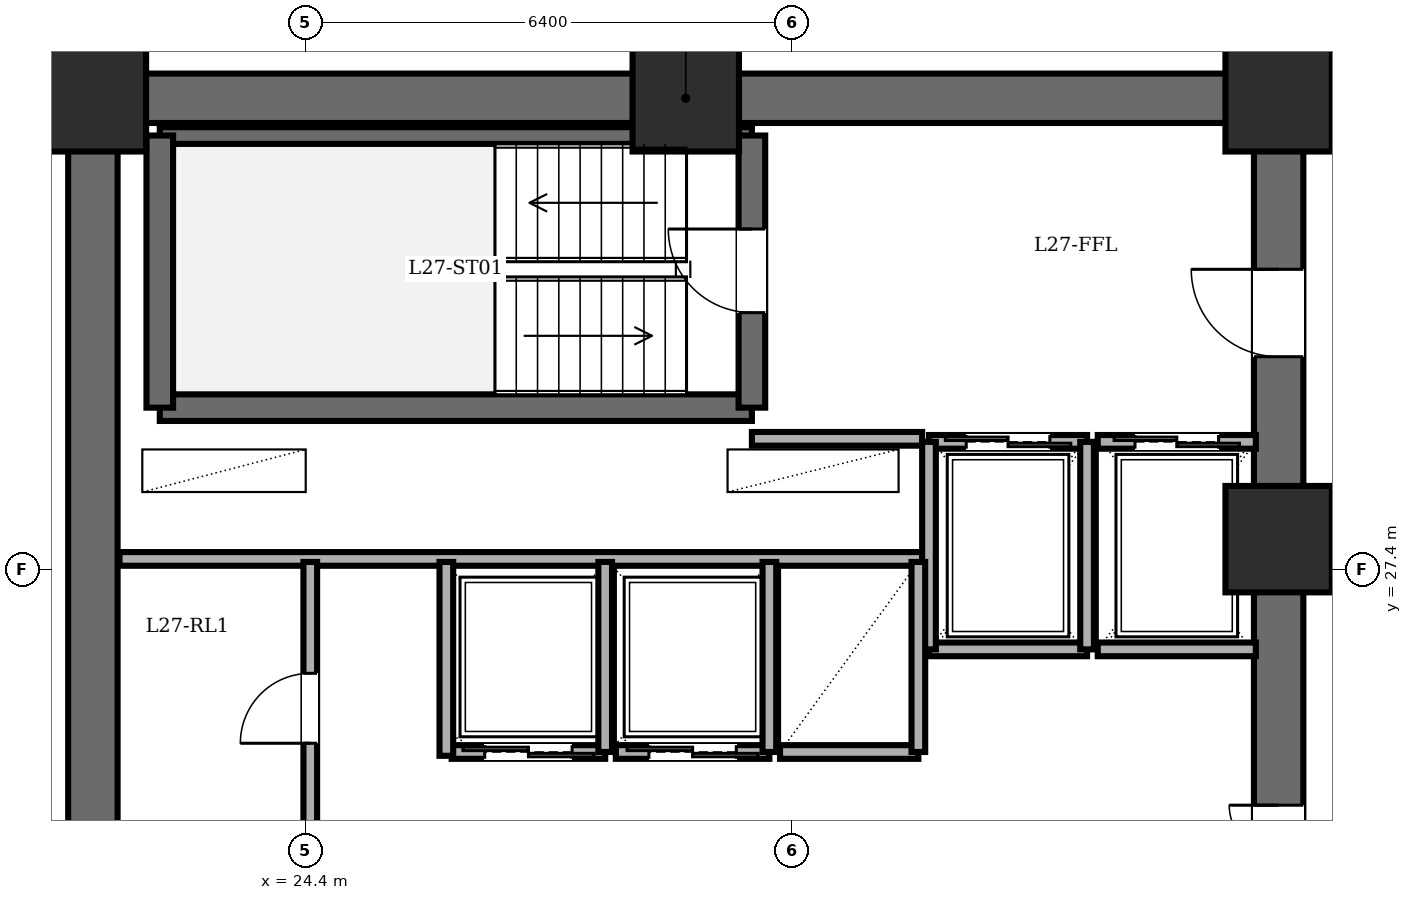
"""IFC4 building model, lengths in metres.
Left out: names, types, materials, properties, quantities, classifications, styles, units other than length and angle.
Written with IfcOpenShell. Run it as: python <this file> out.ifc"""

import sys

from ifc_helpers import new_model, si_unit, direction, frame, frame_2d, origin, origin_2d, place, context, subcontext, project, spatial, rectangle, extrude, element, fill, save


model = new_model("IFC4")
c1 = context("Model", 3, precision=1e-05, world=origin(), true_north=direction((0.0, 1.0)))
c2 = subcontext(c1, "Body", "Model", "MODEL_VIEW")
j1 = project(units=[si_unit("LENGTHUNIT", "METRE"), si_unit("PLANEANGLEUNIT", "RADIAN")], contexts=[c1])
p1 = place(None, origin())
s1 = spatial("IfcSite", under=j1, at=p1, CompositionType="ELEMENT")
p2 = place(p1, origin())
s2 = spatial("IfcBuilding", under=s1, at=p2, CompositionType="ELEMENT")
p3 = place(p2, frame((0.0, 0.0, 104.3)))
s3 = spatial("IfcBuildingStorey", under=s2, at=p3, CompositionType="ELEMENT", Elevation=104.3)
for number, where, z_axis, x_axis in (
    (1, (37.2, 27.8, 0.0), (0.0, 0.0, 1.0), (1.0, 0.0, 0.0)),
    (2, (37.2, 33.6, 0.0), (0.0, 0.0, 1.0), (1.0, 0.0, 0.0)),
    (3, (29.4, 33.6, 0.0), (0.0, 0.0, 1.0), (1.0, 0.0, 0.0)),
    (4, (21.6, 33.6, 0.0), (0.0, 0.0, 1.0), (1.0, 0.0, 0.0)),
):
    element("IfcColumn", number, at=place(p3, frame(where, z_axis=z_axis, x_axis=x_axis)), inside=s3, PredefinedType="COLUMN", context=c2, shape_type="SweptSolid", body=[
        extrude(rectangle(XDim=1.4, YDim=1.4, at=origin_2d()), origin(), (0.0, 0.0, 1.0), 3.6),
    ])
p4 = place(p3, frame((21.6, 14.4, 0.0), z_axis=(0.0, 0.0, 1.0), x_axis=(0.0, 1.0, 0.0)))
e5 = element("IfcWall", 5, at=p4, inside=s3, PredefinedType="SHEAR", context=c2, shape_type="SweptSolid", body=[
    extrude(rectangle(XDim=19.2, YDim=0.65, at=frame_2d((9.6, 0.0))), origin(), (0.0, 0.0, 1.0), 3.4),
])
p5 = place(p3, frame((21.6, 33.6, 0.0), z_axis=(0.0, 0.0, 1.0), x_axis=(1.0, 0.0, 0.0)))
e6 = element("IfcWall", 6, at=p5, inside=s3, PredefinedType="SHEAR", context=c2, shape_type="SweptSolid", body=[
    extrude(rectangle(XDim=15.6, YDim=0.65, at=frame_2d((7.8, 0.0))), origin(), (0.0, 0.0, 1.0), 3.4),
])
p6 = place(p3, frame((37.2, 14.4, 0.0), z_axis=(0.0, 0.0, 1.0), x_axis=(0.0, 1.0, 0.0)))
e7 = element("IfcWall", 7, at=p6, inside=s3, PredefinedType="SHEAR", context=c2, shape_type="SweptSolid", body=[
    extrude(rectangle(XDim=19.2, YDim=0.65, at=frame_2d((9.6, 0.0))), origin(), (0.0, 0.0, 1.0), 3.4),
])
p7 = place(p6, frame((15.8, 0.0, 0.0)))
e8 = element("IfcOpeningElement", 8, at=p7, cuts=e7, PredefinedType="OPENING", context=c2, shape_type="SweptSolid", body=[
    extrude(rectangle(XDim=1.15, YDim=2.15, at=frame_2d((0.575, 1.075))), frame((0.0, 0.335, 0.0), z_axis=(0.0, -1.0, 0.0), x_axis=(1.0, 0.0, 0.0)), (0.0, 0.0, 1.0), 0.67),
])
p8 = place(p6, frame((3.6, 0.0, 0.0)))
e9 = element("IfcOpeningElement", 9, at=p8, cuts=e7, PredefinedType="OPENING", context=c2, shape_type="SweptSolid", body=[
    extrude(rectangle(XDim=1.1, YDim=2.15, at=frame_2d((0.55, 1.075))), frame((0.0, 0.335, 0.0), z_axis=(0.0, -1.0, 0.0), x_axis=(1.0, 0.0, 0.0)), (0.0, 0.0, 1.0), 0.67),
])
p9 = place(p6, frame((8.6, 0.0, 0.0)))
e10 = element("IfcOpeningElement", 10, at=p9, cuts=e7, PredefinedType="OPENING", context=c2, shape_type="SweptSolid", body=[
    extrude(rectangle(XDim=1.3, YDim=2.2, at=frame_2d((0.65, 1.1))), frame((0.0, 0.335, 0.0), z_axis=(0.0, -1.0, 0.0), x_axis=(1.0, 0.0, 0.0)), (0.0, 0.0, 1.0), 0.67),
])
p10 = place(p3, frame((22.48, 29.53, 0.0), z_axis=(0.0, 0.0, 1.0), x_axis=(1.0, 0.0, 0.0)))
e11 = element("IfcWall", 11, at=p10, inside=s3, PredefinedType="SOLIDWALL", context=c2, shape_type="SweptSolid", body=[
    extrude(rectangle(XDim=7.79, YDim=0.35, at=frame_2d((3.895, 0.0))), origin(), (0.0, 0.0, 1.0), 3.4),
])
p11 = place(p3, frame((22.48, 33.11, 0.0), z_axis=(0.0, 0.0, 1.0), x_axis=(1.0, 0.0, 0.0)))
e12 = element("IfcWall", 12, at=p11, inside=s3, PredefinedType="PARTITIONING", context=c2, shape_type="SweptSolid", body=[
    extrude(rectangle(XDim=7.79, YDim=0.22, at=frame_2d((3.895, 0.0))), origin(), (0.0, 0.0, 1.0), 3.4),
])
p12 = place(p3, frame((22.48, 29.53, 0.0), z_axis=(0.0, 0.0, 1.0), x_axis=(0.0, 1.0, 0.0)))
e13 = element("IfcWall", 13, at=p12, inside=s3, PredefinedType="SOLIDWALL", context=c2, shape_type="SweptSolid", body=[
    extrude(rectangle(XDim=3.58, YDim=0.35, at=frame_2d((1.79, 0.0))), origin(), (0.0, 0.0, 1.0), 3.4),
])
p13 = place(p3, frame((30.27, 29.53, 0.0), z_axis=(0.0, 0.0, 1.0), x_axis=(0.0, 1.0, 0.0)))
e14 = element("IfcWall", 14, at=p13, inside=s3, PredefinedType="SOLIDWALL", context=c2, shape_type="SweptSolid", body=[
    extrude(rectangle(XDim=3.58, YDim=0.35, at=frame_2d((1.79, 0.0))), origin(), (0.0, 0.0, 1.0), 3.4),
])
p14 = place(p13, frame((1.25, 0.0, 0.0)))
e15 = element("IfcOpeningElement", 15, at=p14, cuts=e14, PredefinedType="OPENING", context=c2, shape_type="SweptSolid", body=[
    extrude(rectangle(XDim=1.1, YDim=2.15, at=frame_2d((0.55, 1.075))), frame((0.0, 0.185, 0.0), z_axis=(0.0, -1.0, 0.0), x_axis=(1.0, 0.0, 0.0)), (0.0, 0.0, 1.0), 0.37),
])
p15 = place(p3, frame((30.27, 29.12, 0.0), z_axis=(0.0, 0.0, 1.0), x_axis=(1.0, 0.0, 0.0)))
e16 = element("IfcWall", 16, at=p15, inside=s3, PredefinedType="PARTITIONING", context=c2, shape_type="SweptSolid", body=[
    extrude(rectangle(XDim=2.24, YDim=0.18, at=frame_2d((1.12, 0.0))), origin(), (0.0, 0.0, 1.0), 3.4),
])
p16 = place(p3, frame((21.95, 27.54, 0.0), z_axis=(0.0, 0.0, 1.0), x_axis=(1.0, 0.0, 0.0)))
e17 = element("IfcWall", 17, at=p16, inside=s3, PredefinedType="PARTITIONING", context=c2, shape_type="SweptSolid", body=[
    extrude(rectangle(XDim=10.56, YDim=0.18, at=frame_2d((5.28, 0.0))), origin(), (0.0, 0.0, 1.0), 3.4),
])
p17 = place(p3, frame((32.6, 29.08, 0.0), z_axis=(0.0, 0.0, 1.0), x_axis=(1.0, 0.0, 0.0)))
e18 = element("IfcWall", 18, at=p17, inside=s3, PredefinedType="PARTITIONING", context=c2, shape_type="SweptSolid", body=[
    extrude(rectangle(XDim=2.08, YDim=0.18, at=frame_2d((1.04, 0.0))), origin(), (0.0, 0.0, 1.0), 3.4),
])
p18 = place(p17, frame((0.49, 0.0, 0.0)))
e19 = element("IfcOpeningElement", 19, at=p18, cuts=e18, PredefinedType="OPENING", context=c2, shape_type="SweptSolid", body=[
    extrude(rectangle(XDim=1.1, YDim=2.2, at=frame_2d((0.55, 1.1))), frame((0.0, 0.1, 0.0), z_axis=(0.0, -1.0, 0.0), x_axis=(1.0, 0.0, 0.0)), (0.0, 0.0, 1.0), 0.2),
])
p19 = place(p3, frame((34.68, 26.35, 0.0), z_axis=(0.0, 0.0, 1.0), x_axis=(-1.0, 0.0, 0.0)))
e20 = element("IfcWall", 20, at=p19, inside=s3, PredefinedType="PARTITIONING", context=c2, shape_type="SweptSolid", body=[
    extrude(rectangle(XDim=2.08, YDim=0.18, at=frame_2d((1.04, 0.0))), origin(), (0.0, 0.0, 1.0), 3.4),
])
for number, where, z_axis, x_axis in (
    (21, (34.68, 26.35, 0.0), (0.0, 0.0, 1.0), (0.0, 1.0, 0.0)),
    (22, (32.6, 29.08, 0.0), (0.0, 0.0, 1.0), (0.0, -1.0, 0.0)),
):
    element("IfcWall", number, at=place(p3, frame(where, z_axis=z_axis, x_axis=x_axis)), inside=s3, PredefinedType="PARTITIONING", context=c2, shape_type="SweptSolid", body=[
        extrude(rectangle(XDim=2.73, YDim=0.18, at=frame_2d((1.365, 0.0))), origin(), (0.0, 0.0, 1.0), 3.4),
    ])
p20 = place(p3, frame((34.82, 29.08, 0.0), z_axis=(0.0, 0.0, 1.0), x_axis=(1.0, 0.0, 0.0)))
e23 = element("IfcWall", 23, at=p20, inside=s3, PredefinedType="PARTITIONING", context=c2, shape_type="SweptSolid", body=[
    extrude(rectangle(XDim=2.08, YDim=0.18, at=frame_2d((1.04, 0.0))), origin(), (0.0, 0.0, 1.0), 3.4),
])
p21 = place(p20, frame((0.49, 0.0, 0.0)))
e24 = element("IfcOpeningElement", 24, at=p21, cuts=e23, PredefinedType="OPENING", context=c2, shape_type="SweptSolid", body=[
    extrude(rectangle(XDim=1.1, YDim=2.2, at=frame_2d((0.55, 1.1))), frame((0.0, 0.1, 0.0), z_axis=(0.0, -1.0, 0.0), x_axis=(1.0, 0.0, 0.0)), (0.0, 0.0, 1.0), 0.2),
])
p22 = place(p3, frame((36.9, 26.35, 0.0), z_axis=(0.0, 0.0, 1.0), x_axis=(-1.0, 0.0, 0.0)))
e25 = element("IfcWall", 25, at=p22, inside=s3, PredefinedType="PARTITIONING", context=c2, shape_type="SweptSolid", body=[
    extrude(rectangle(XDim=2.08, YDim=0.18, at=frame_2d((1.04, 0.0))), origin(), (0.0, 0.0, 1.0), 3.4),
])
p23 = place(p3, frame((28.34, 25.0, 0.0), z_axis=(0.0, 0.0, 1.0), x_axis=(-1.0, 0.0, 0.0)))
e26 = element("IfcWall", 26, at=p23, inside=s3, PredefinedType="PARTITIONING", context=c2, shape_type="SweptSolid", body=[
    extrude(rectangle(XDim=2.02, YDim=0.18, at=frame_2d((1.01, 0.0))), origin(), (0.0, 0.0, 1.0), 3.4),
])
p24 = place(p23, frame((0.435, 0.0, 0.0)))
e27 = element("IfcOpeningElement", 27, at=p24, cuts=e26, PredefinedType="OPENING", context=c2, shape_type="SweptSolid", body=[
    extrude(rectangle(XDim=1.15, YDim=2.2, at=frame_2d((0.575, 1.1))), frame((0.0, 0.1, 0.0), z_axis=(0.0, -1.0, 0.0), x_axis=(1.0, 0.0, 0.0)), (0.0, 0.0, 1.0), 0.2),
])
p25 = place(p3, frame((28.34, 25.0, 0.0), z_axis=(0.0, 0.0, 1.0), x_axis=(0.0, 1.0, 0.0)))
e28 = element("IfcWall", 28, at=p25, inside=s3, PredefinedType="PARTITIONING", context=c2, shape_type="SweptSolid", body=[
    extrude(rectangle(XDim=2.5, YDim=0.18, at=frame_2d((1.25, 0.0))), origin(), (0.0, 0.0, 1.0), 3.4),
])
p26 = place(p3, frame((30.5, 25.0, 0.0), z_axis=(0.0, 0.0, 1.0), x_axis=(-1.0, 0.0, 0.0)))
e29 = element("IfcWall", 29, at=p26, inside=s3, PredefinedType="PARTITIONING", context=c2, shape_type="SweptSolid", body=[
    extrude(rectangle(XDim=2.02, YDim=0.18, at=frame_2d((1.01, 0.0))), origin(), (0.0, 0.0, 1.0), 3.4),
])
p27 = place(p26, frame((0.435, 0.0, 0.0)))
e30 = element("IfcOpeningElement", 30, at=p27, cuts=e29, PredefinedType="OPENING", context=c2, shape_type="SweptSolid", body=[
    extrude(rectangle(XDim=1.15, YDim=2.2, at=frame_2d((0.575, 1.1))), frame((0.0, 0.1, 0.0), z_axis=(0.0, -1.0, 0.0), x_axis=(1.0, 0.0, 0.0)), (0.0, 0.0, 1.0), 0.2),
])
p28 = place(p3, frame((30.5, 25.0, 0.0), z_axis=(0.0, 0.0, 1.0), x_axis=(0.0, 1.0, 0.0)))
e31 = element("IfcWall", 31, at=p28, inside=s3, PredefinedType="PARTITIONING", context=c2, shape_type="SweptSolid", body=[
    extrude(rectangle(XDim=2.5, YDim=0.18, at=frame_2d((1.25, 0.0))), origin(), (0.0, 0.0, 1.0), 3.4),
])
p29 = place(p3, frame((32.46, 25.0, 0.0), z_axis=(0.0, 0.0, 1.0), x_axis=(-1.0, 0.0, 0.0)))
e32 = element("IfcWall", 32, at=p29, inside=s3, PredefinedType="PARTITIONING", context=c2, shape_type="SweptSolid", body=[
    extrude(rectangle(XDim=1.82, YDim=0.18, at=frame_2d((0.91, 0.0))), origin(), (0.0, 0.0, 1.0), 3.4),
])
p30 = place(p3, frame((32.46, 25.0, 0.0), z_axis=(0.0, 0.0, 1.0), x_axis=(0.0, 1.0, 0.0)))
e33 = element("IfcWall", 33, at=p30, inside=s3, PredefinedType="PARTITIONING", context=c2, shape_type="SweptSolid", body=[
    extrude(rectangle(XDim=2.5, YDim=0.18, at=frame_2d((1.25, 0.0))), origin(), (0.0, 0.0, 1.0), 3.4),
])
p31 = place(p3, frame((24.46, 23.65, 0.0), z_axis=(0.0, 0.0, 1.0), x_axis=(0.0, 1.0, 0.0)))
e34 = element("IfcWall", 34, at=p31, inside=s3, PredefinedType="PARTITIONING", context=c2, shape_type="SweptSolid", body=[
    extrude(rectangle(XDim=3.85, YDim=0.18, at=frame_2d((1.925, 0.0))), origin(), (0.0, 0.0, 1.0), 3.4),
])
p32 = place(p31, frame((1.465, 0.0, 0.0)))
e35 = element("IfcOpeningElement", 35, at=p32, cuts=e34, PredefinedType="OPENING", context=c2, shape_type="SweptSolid", body=[
    extrude(rectangle(XDim=0.92, YDim=2.1, at=frame_2d((0.46, 1.05))), frame((0.0, 0.1, 0.0), z_axis=(0.0, -1.0, 0.0), x_axis=(1.0, 0.0, 0.0)), (0.0, 0.0, 1.0), 0.2),
])
p33 = place(p3, frame((26.25, 24.95, 0.0), z_axis=(0.0, 0.0, 1.0), x_axis=(0.0, 1.0, 0.0)))
e36 = element("IfcWall", 36, at=p33, inside=s3, PredefinedType="PARTITIONING", context=c2, shape_type="SweptSolid", body=[
    extrude(rectangle(XDim=2.55, YDim=0.18, at=frame_2d((1.275, 0.0))), origin(), (0.0, 0.0, 1.0), 3.4),
])
p34 = place(p3, frame((8.8, 33.82, 0.0), z_axis=(0.0, 0.0, 1.0), x_axis=(1.0, 0.0, 0.0)))
e37 = element("IfcWall", 37, at=p34, inside=s3, PredefinedType="PARTITIONING", context=c2, shape_type="SweptSolid", body=[
    extrude(rectangle(XDim=12.68, YDim=0.18, at=frame_2d((6.34, 0.0))), origin(), (0.0, 0.0, 1.0), 3.4),
])
p35 = place(p34, frame((6.18, 0.0, 0.0)))
e38 = element("IfcOpeningElement", 38, at=p35, cuts=e37, PredefinedType="OPENING", context=c2, shape_type="SweptSolid", body=[
    extrude(rectangle(XDim=1.0, YDim=2.15, at=frame_2d((0.5, 1.075))), frame((0.0, 0.1, 0.0), z_axis=(0.0, -1.0, 0.0), x_axis=(1.0, 0.0, 0.0)), (0.0, 0.0, 1.0), 0.2),
])
p36 = place(p14, origin())
e39 = element("IfcDoor", 39, at=p36, inside=s3, OperationType="SINGLE_SWING_RIGHT", PredefinedType="DOOR", context=c2, shape_type="SweptSolid", body=[
    extrude(rectangle(XDim=1.1, YDim=2.15, at=frame_2d((0.55, 1.075))), frame((0.0, 0.025, 0.0), z_axis=(0.0, -1.0, 0.0), x_axis=(1.0, 0.0, 0.0)), (0.0, 0.0, 1.0), 0.05),
])
fill(e15, e39)
p37 = place(p7, origin())
e40 = element("IfcDoor", 40, at=p37, inside=s3, OperationType="SINGLE_SWING_RIGHT", PredefinedType="DOOR", context=c2, shape_type="SweptSolid", body=[
    extrude(rectangle(XDim=1.15, YDim=2.15, at=frame_2d((0.575, 1.075))), frame((0.0, 0.025, 0.0), z_axis=(0.0, -1.0, 0.0), x_axis=(1.0, 0.0, 0.0)), (0.0, 0.0, 1.0), 0.05),
])
fill(e8, e40)
p38 = place(p18, origin())
e41 = element("IfcDoor", 41, at=p38, inside=s3, OperationType="DOUBLE_DOOR_SLIDING", PredefinedType="DOOR", context=c2, shape_type="SweptSolid", body=[
    extrude(rectangle(XDim=1.1, YDim=2.2, at=frame_2d((0.55, 1.1))), frame((0.0, 0.025, 0.0), z_axis=(0.0, -1.0, 0.0), x_axis=(1.0, 0.0, 0.0)), (0.0, 0.0, 1.0), 0.05),
])
fill(e19, e41)
p39 = place(p21, origin())
e42 = element("IfcDoor", 42, at=p39, inside=s3, OperationType="DOUBLE_DOOR_SLIDING", PredefinedType="DOOR", context=c2, shape_type="SweptSolid", body=[
    extrude(rectangle(XDim=1.1, YDim=2.2, at=frame_2d((0.55, 1.1))), frame((0.0, 0.025, 0.0), z_axis=(0.0, -1.0, 0.0), x_axis=(1.0, 0.0, 0.0)), (0.0, 0.0, 1.0), 0.05),
])
fill(e24, e42)
p40 = place(p24, origin())
e43 = element("IfcDoor", 43, at=p40, inside=s3, OperationType="DOUBLE_DOOR_SLIDING", PredefinedType="DOOR", context=c2, shape_type="SweptSolid", body=[
    extrude(rectangle(XDim=1.15, YDim=2.2, at=frame_2d((0.575, 1.1))), frame((0.0, 0.025, 0.0), z_axis=(0.0, -1.0, 0.0), x_axis=(1.0, 0.0, 0.0)), (0.0, 0.0, 1.0), 0.05),
])
fill(e27, e43)
p41 = place(p27, origin())
e44 = element("IfcDoor", 44, at=p41, inside=s3, OperationType="DOUBLE_DOOR_SLIDING", PredefinedType="DOOR", context=c2, shape_type="SweptSolid", body=[
    extrude(rectangle(XDim=1.15, YDim=2.2, at=frame_2d((0.575, 1.1))), frame((0.0, 0.025, 0.0), z_axis=(0.0, -1.0, 0.0), x_axis=(1.0, 0.0, 0.0)), (0.0, 0.0, 1.0), 0.05),
])
fill(e30, e44)
p42 = place(p32, origin())
e45 = element("IfcDoor", 45, at=p42, inside=s3, OperationType="SINGLE_SWING_LEFT", PredefinedType="DOOR", context=c2, shape_type="SweptSolid", body=[
    extrude(rectangle(XDim=0.92, YDim=2.1, at=frame_2d((0.46, 1.05))), frame((0.0, 0.025, 0.0), z_axis=(0.0, -1.0, 0.0), x_axis=(1.0, 0.0, 0.0)), (0.0, 0.0, 1.0), 0.05),
])
fill(e35, e45)
p43 = place(p9, origin())
e46 = element("IfcDoor", 46, at=p43, inside=s3, OperationType="DOUBLE_DOOR_SINGLE_SWING", PredefinedType="DOOR", context=c2, shape_type="SweptSolid", body=[
    extrude(rectangle(XDim=1.3, YDim=2.2, at=frame_2d((0.65, 1.1))), frame((0.0, 0.025, 0.0), z_axis=(0.0, -1.0, 0.0), x_axis=(1.0, 0.0, 0.0)), (0.0, 0.0, 1.0), 0.05),
])
fill(e10, e46)
save(model, sys.argv[1])
